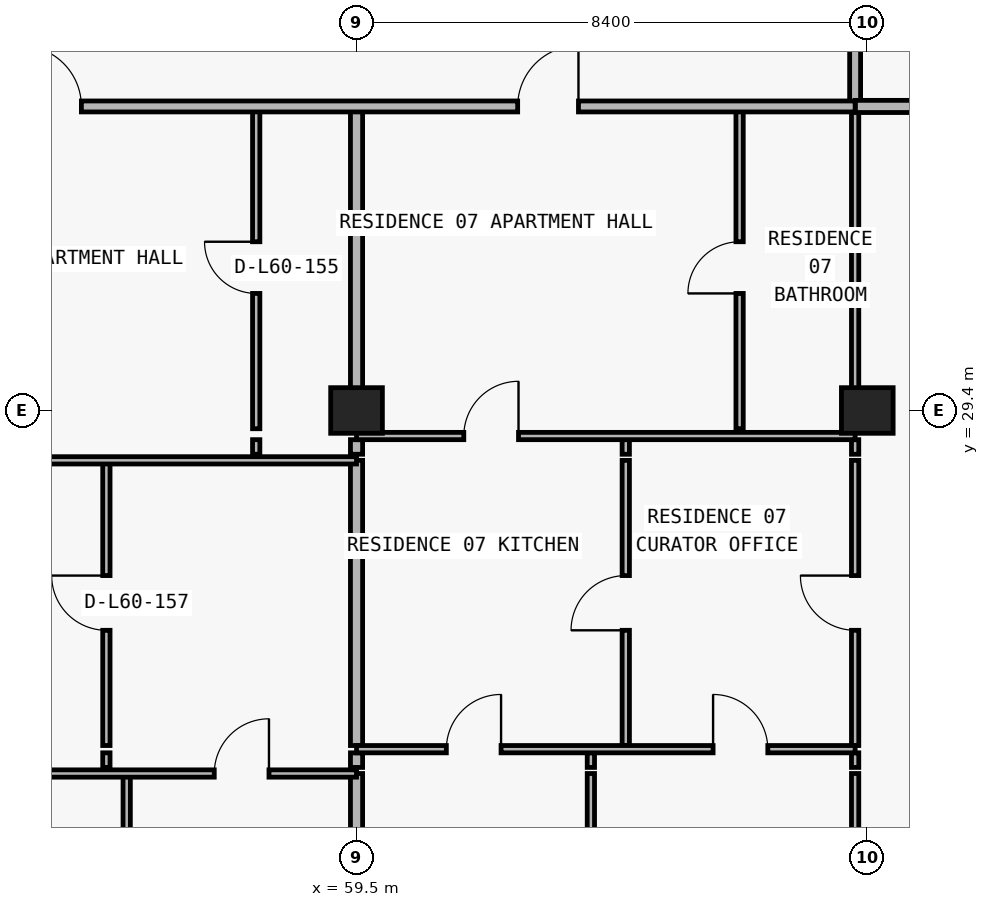
"""IFC4 building model, lengths in metres.
Left out: names, types, materials, properties, quantities, classifications, styles, units other than length and angle.
Written with IfcOpenShell. Run it as: python <this file> out.ifc"""

import sys

from ifc_helpers import new_model, si_unit, direction, frame, frame_2d, origin, origin_2d, place, context, subcontext, project, spatial, rectangle, extrude, element, fill, save


model = new_model("IFC4")
c1 = context("Model", 3, precision=1e-05, world=origin(), true_north=direction((0.0, 1.0)))
c2 = subcontext(c1, "Body", "Model", "MODEL_VIEW")
j1 = project(units=[si_unit("LENGTHUNIT", "METRE"), si_unit("PLANEANGLEUNIT", "RADIAN")], contexts=[c1])
p1 = place(None, origin())
s1 = spatial("IfcSite", under=j1, at=p1, CompositionType="ELEMENT")
p2 = place(p1, origin())
s2 = spatial("IfcBuilding", under=s1, at=p2, CompositionType="ELEMENT")
p3 = place(p2, frame((0.0, 0.0, 214.8)))
s3 = spatial("IfcBuildingStorey", under=s2, at=p3, CompositionType="ELEMENT", Elevation=214.8)
for number, where, z_axis, x_axis in (
    (1, (59.5, 29.4, 0.0), (0.0, 0.0, 1.0), (1.0, 0.0, 0.0)),
    (2, (67.9, 29.4, 0.0), (0.0, 0.0, 1.0), (1.0, 0.0, 0.0)),
):
    element("IfcColumn", number, at=place(p3, frame(where, z_axis=z_axis, x_axis=x_axis)), inside=s3, PredefinedType="COLUMN", context=c2, shape_type="SweptSolid", body=[
        extrude(rectangle(XDim=0.85, YDim=0.75, at=origin_2d()), origin(), (0.0, 0.0, 1.0), 3.05),
    ])
p4 = place(p3, frame((55.386, 23.53, 0.0), z_axis=(0.0, 0.0, 1.0), x_axis=(0.0, 1.0, 0.0)))
e3 = element("IfcWall", 3, at=p4, inside=s3, PredefinedType="PARTITIONING", context=c2, shape_type="SweptSolid", body=[
    extrude(rectangle(XDim=0.24, YDim=0.12, at=frame_2d((0.12, 0.0))), origin(), (0.0, 0.0, 1.0), 3.05),
])
p5 = place(p3, frame((55.386, 23.89, 0.0), z_axis=(0.0, 0.0, 1.0), x_axis=(0.0, 1.0, 0.0)))
e4 = element("IfcWall", 4, at=p5, inside=s3, PredefinedType="PARTITIONING", context=c2, shape_type="SweptSolid", body=[
    extrude(rectangle(XDim=4.69, YDim=0.12, at=frame_2d((2.345, 0.0))), origin(), (0.0, 0.0, 1.0), 3.05),
])
p6 = place(p5, frame((1.895, 0.0, 0.0)))
e5 = element("IfcOpeningElement", 5, at=p6, cuts=e4, PredefinedType="OPENING", context=c2, shape_type="SweptSolid", body=[
    extrude(rectangle(XDim=0.9, YDim=2.15, at=frame_2d((0.45, 1.075))), frame((0.0, 0.07, 0.0), z_axis=(0.0, -1.0, 0.0), x_axis=(1.0, 0.0, 0.0)), (0.0, 0.0, 1.0), 0.14),
])
p7 = place(p3, frame((55.72, 11.24, 0.0), z_axis=(0.0, 0.0, 1.0), x_axis=(0.0, 1.0, 0.0)))
e6 = element("IfcWall", 6, at=p7, inside=s3, PredefinedType="PARTITIONING", context=c2, shape_type="SweptSolid", body=[
    extrude(rectangle(XDim=12.19, YDim=0.12, at=frame_2d((6.095, 0.0))), origin(), (0.0, 0.0, 1.0), 3.05),
])
p8 = place(p3, frame((57.85, 28.68, 0.0), z_axis=(0.0, 0.0, 1.0), x_axis=(0.0, 1.0, 0.0)))
e7 = element("IfcWall", 7, at=p8, inside=s3, PredefinedType="PARTITIONING", context=c2, shape_type="SweptSolid", body=[
    extrude(rectangle(XDim=0.24, YDim=0.12, at=frame_2d((0.12, 0.0))), origin(), (0.0, 0.0, 1.0), 3.05),
])
p9 = place(p3, frame((57.85, 29.1, 0.0), z_axis=(0.0, 0.0, 1.0), x_axis=(0.0, 1.0, 0.0)))
e8 = element("IfcWall", 8, at=p9, inside=s3, PredefinedType="PARTITIONING", context=c2, shape_type="SweptSolid", body=[
    extrude(rectangle(XDim=5.3, YDim=0.12, at=frame_2d((2.65, 0.0))), origin(), (0.0, 0.0, 1.0), 3.05),
])
p10 = place(p9, frame((2.225, 0.0, 0.0)))
e9 = element("IfcOpeningElement", 9, at=p10, cuts=e8, PredefinedType="OPENING", context=c2, shape_type="SweptSolid", body=[
    extrude(rectangle(XDim=0.85, YDim=2.1, at=frame_2d((0.425, 1.05))), frame((0.0, 0.07, 0.0), z_axis=(0.0, -1.0, 0.0), x_axis=(1.0, 0.0, 0.0)), (0.0, 0.0, 1.0), 0.14),
])
p11 = place(p3, frame((59.5, 11.24, 0.0), z_axis=(0.0, 0.0, 1.0), x_axis=(0.0, 1.0, 0.0)))
e10 = element("IfcWall", 10, at=p11, inside=s3, PredefinedType="PARTITIONING", context=c2, shape_type="SweptSolid", body=[
    extrude(rectangle(XDim=12.19, YDim=0.2, at=frame_2d((6.095, 0.0))), origin(), (0.0, 0.0, 1.0), 2.263),
])
p12 = place(p3, frame((59.5, 23.53, 0.0), z_axis=(0.0, 0.0, 1.0), x_axis=(0.0, 1.0, 0.0)))
e11 = element("IfcWall", 11, at=p12, inside=s3, PredefinedType="PARTITIONING", context=c2, shape_type="SweptSolid", body=[
    extrude(rectangle(XDim=0.24, YDim=0.2, at=frame_2d((0.12, 0.0))), origin(), (0.0, 0.0, 1.0), 2.263),
])
p13 = place(p3, frame((59.5, 23.89, 0.0), z_axis=(0.0, 0.0, 1.0), x_axis=(0.0, 1.0, 0.0)))
e12 = element("IfcWall", 12, at=p13, inside=s3, PredefinedType="PARTITIONING", context=c2, shape_type="SweptSolid", body=[
    extrude(rectangle(XDim=4.69, YDim=0.2, at=frame_2d((2.345, 0.0))), origin(), (0.0, 0.0, 1.0), 2.263),
])
p14 = place(p3, frame((59.5, 28.68, 0.0), z_axis=(0.0, 0.0, 1.0), x_axis=(0.0, 1.0, 0.0)))
e13 = element("IfcWall", 13, at=p14, inside=s3, PredefinedType="PARTITIONING", context=c2, shape_type="SweptSolid", body=[
    extrude(rectangle(XDim=0.24, YDim=0.2, at=frame_2d((0.12, 0.0))), origin(), (0.0, 0.0, 1.0), 2.263),
])
p15 = place(p3, frame((59.5, 29.1, 0.0), z_axis=(0.0, 0.0, 1.0), x_axis=(0.0, 1.0, 0.0)))
e14 = element("IfcWall", 14, at=p15, inside=s3, PredefinedType="PARTITIONING", context=c2, shape_type="SweptSolid", body=[
    extrude(rectangle(XDim=5.3, YDim=0.2, at=frame_2d((2.65, 0.0))), origin(), (0.0, 0.0, 1.0), 2.263),
])
p16 = place(p3, frame((63.354, 11.24, 0.0), z_axis=(0.0, 0.0, 1.0), x_axis=(0.0, 1.0, 0.0)))
e15 = element("IfcWall", 15, at=p16, inside=s3, PredefinedType="PARTITIONING", context=c2, shape_type="SweptSolid", body=[
    extrude(rectangle(XDim=12.19, YDim=0.12, at=frame_2d((6.095, 0.0))), origin(), (0.0, 0.0, 1.0), 3.05),
])
p17 = place(p3, frame((63.354, 23.53, 0.0), z_axis=(0.0, 0.0, 1.0), x_axis=(0.0, 1.0, 0.0)))
e16 = element("IfcWall", 16, at=p17, inside=s3, PredefinedType="PARTITIONING", context=c2, shape_type="SweptSolid", body=[
    extrude(rectangle(XDim=0.24, YDim=0.12, at=frame_2d((0.12, 0.0))), origin(), (0.0, 0.0, 1.0), 3.05),
])
p18 = place(p3, frame((63.928, 23.89, 0.0), z_axis=(0.0, 0.0, 1.0), x_axis=(0.0, 1.0, 0.0)))
e17 = element("IfcWall", 17, at=p18, inside=s3, PredefinedType="PARTITIONING", context=c2, shape_type="SweptSolid", body=[
    extrude(rectangle(XDim=4.69, YDim=0.12, at=frame_2d((2.345, 0.0))), origin(), (0.0, 0.0, 1.0), 3.05),
])
p19 = place(p18, frame((1.895, 0.0, 0.0)))
e18 = element("IfcOpeningElement", 18, at=p19, cuts=e17, PredefinedType="OPENING", context=c2, shape_type="SweptSolid", body=[
    extrude(rectangle(XDim=0.9, YDim=2.15, at=frame_2d((0.45, 1.075))), frame((0.0, 0.07, 0.0), z_axis=(0.0, -1.0, 0.0), x_axis=(1.0, 0.0, 0.0)), (0.0, 0.0, 1.0), 0.14),
])
p20 = place(p3, frame((63.928, 28.68, 0.0), z_axis=(0.0, 0.0, 1.0), x_axis=(0.0, 1.0, 0.0)))
e19 = element("IfcWall", 19, at=p20, inside=s3, PredefinedType="PARTITIONING", context=c2, shape_type="SweptSolid", body=[
    extrude(rectangle(XDim=0.24, YDim=0.12, at=frame_2d((0.12, 0.0))), origin(), (0.0, 0.0, 1.0), 3.05),
])
p21 = place(p3, frame((65.8, 29.1, 0.0), z_axis=(0.0, 0.0, 1.0), x_axis=(0.0, 1.0, 0.0)))
e20 = element("IfcWall", 20, at=p21, inside=s3, PredefinedType="PARTITIONING", context=c2, shape_type="SweptSolid", body=[
    extrude(rectangle(XDim=5.3, YDim=0.12, at=frame_2d((2.65, 0.0))), origin(), (0.0, 0.0, 1.0), 3.05),
])
p22 = place(p21, frame((2.225, 0.0, 0.0)))
e21 = element("IfcOpeningElement", 21, at=p22, cuts=e20, PredefinedType="OPENING", context=c2, shape_type="SweptSolid", body=[
    extrude(rectangle(XDim=0.85, YDim=2.1, at=frame_2d((0.425, 1.05))), frame((0.0, 0.07, 0.0), z_axis=(0.0, -1.0, 0.0), x_axis=(1.0, 0.0, 0.0)), (0.0, 0.0, 1.0), 0.14),
])
p23 = place(p3, frame((67.7, 11.32, 0.0), z_axis=(0.0, 0.0, 1.0), x_axis=(0.0, 1.0, 0.0)))
e22 = element("IfcWall", 22, at=p23, inside=s3, PredefinedType="PARTITIONING", context=c2, shape_type="SweptSolid", body=[
    extrude(rectangle(XDim=12.11, YDim=0.12, at=frame_2d((6.055, 0.0))), origin(), (0.0, 0.0, 1.0), 2.263),
])
p24 = place(p3, frame((67.7, 23.53, 0.0), z_axis=(0.0, 0.0, 1.0), x_axis=(0.0, 1.0, 0.0)))
e23 = element("IfcWall", 23, at=p24, inside=s3, PredefinedType="PARTITIONING", context=c2, shape_type="SweptSolid", body=[
    extrude(rectangle(XDim=0.24, YDim=0.12, at=frame_2d((0.12, 0.0))), origin(), (0.0, 0.0, 1.0), 2.263),
])
p25 = place(p3, frame((67.7, 23.89, 0.0), z_axis=(0.0, 0.0, 1.0), x_axis=(0.0, 1.0, 0.0)))
e24 = element("IfcWall", 24, at=p25, inside=s3, PredefinedType="PARTITIONING", context=c2, shape_type="SweptSolid", body=[
    extrude(rectangle(XDim=4.69, YDim=0.12, at=frame_2d((2.345, 0.0))), origin(), (0.0, 0.0, 1.0), 2.263),
])
p26 = place(p25, frame((1.895, 0.0, 0.0)))
e25 = element("IfcOpeningElement", 25, at=p26, cuts=e24, PredefinedType="OPENING", context=c2, shape_type="SweptSolid", body=[
    extrude(rectangle(XDim=0.9, YDim=2.15, at=frame_2d((0.45, 1.075))), frame((0.0, 0.07, 0.0), z_axis=(0.0, -1.0, 0.0), x_axis=(1.0, 0.0, 0.0)), (0.0, 0.0, 1.0), 0.14),
])
p27 = place(p3, frame((67.7, 28.68, 0.0), z_axis=(0.0, 0.0, 1.0), x_axis=(0.0, 1.0, 0.0)))
e26 = element("IfcWall", 26, at=p27, inside=s3, PredefinedType="PARTITIONING", context=c2, shape_type="SweptSolid", body=[
    extrude(rectangle(XDim=0.24, YDim=0.12, at=frame_2d((0.12, 0.0))), origin(), (0.0, 0.0, 1.0), 2.263),
])
p28 = place(p3, frame((67.7, 29.1, 0.0), z_axis=(0.0, 0.0, 1.0), x_axis=(0.0, 1.0, 0.0)))
e27 = element("IfcWall", 27, at=p28, inside=s3, PredefinedType="PARTITIONING", context=c2, shape_type="SweptSolid", body=[
    extrude(rectangle(XDim=5.3, YDim=0.12, at=frame_2d((2.65, 0.0))), origin(), (0.0, 0.0, 1.0), 2.263),
])
p29 = place(p3, frame((67.7, 34.405, 0.0), z_axis=(0.0, 0.0, 1.0), x_axis=(0.0, 1.0, 0.0)))
e28 = element("IfcWall", 28, at=p29, inside=s3, PredefinedType="PARTITIONING", context=c2, shape_type="SweptSolid", body=[
    extrude(rectangle(XDim=2.595, YDim=0.18, at=frame_2d((1.297, 0.0))), origin(), (0.0, 0.0, 1.0), 2.263),
])
p30 = place(p3, frame((51.32, 23.43, 0.0), z_axis=(0.0, 0.0, 1.0), x_axis=(1.0, 0.0, 0.0)))
e29 = element("IfcWall", 29, at=p30, inside=s3, PredefinedType="PARTITIONING", context=c2, shape_type="SweptSolid", body=[
    extrude(rectangle(XDim=8.18, YDim=0.12, at=frame_2d((4.09, 0.0))), origin(), (0.0, 0.0, 1.0), 3.05),
])
p31 = place(p30, frame((1.583, 0.0, 0.0)))
e30 = element("IfcOpeningElement", 30, at=p31, cuts=e29, PredefinedType="OPENING", context=c2, shape_type="SweptSolid", body=[
    extrude(rectangle(XDim=0.9, YDim=2.15, at=frame_2d((0.45, 1.075))), frame((0.0, 0.07, 0.0), z_axis=(0.0, -1.0, 0.0), x_axis=(1.0, 0.0, 0.0)), (0.0, 0.0, 1.0), 0.14),
])
p32 = place(p30, frame((5.84, 0.0, 0.0)))
e31 = element("IfcOpeningElement", 31, at=p32, cuts=e29, PredefinedType="OPENING", context=c2, shape_type="SweptSolid", body=[
    extrude(rectangle(XDim=0.9, YDim=2.15, at=frame_2d((0.45, 1.075))), frame((0.0, 0.07, 0.0), z_axis=(0.0, -1.0, 0.0), x_axis=(1.0, 0.0, 0.0)), (0.0, 0.0, 1.0), 0.14),
])
p33 = place(p3, frame((59.5, 23.83, 0.0), z_axis=(0.0, 0.0, 1.0), x_axis=(1.0, 0.0, 0.0)))
e32 = element("IfcWall", 32, at=p33, inside=s3, PredefinedType="PARTITIONING", context=c2, shape_type="SweptSolid", body=[
    extrude(rectangle(XDim=8.2, YDim=0.12, at=frame_2d((4.1, 0.0))), origin(), (0.0, 0.0, 1.0), 3.05),
])
p34 = place(p33, frame((1.477, 0.0, 0.0)))
e33 = element("IfcOpeningElement", 33, at=p34, cuts=e32, PredefinedType="OPENING", context=c2, shape_type="SweptSolid", body=[
    extrude(rectangle(XDim=0.9, YDim=2.15, at=frame_2d((0.45, 1.075))), frame((0.0, 0.07, 0.0), z_axis=(0.0, -1.0, 0.0), x_axis=(1.0, 0.0, 0.0)), (0.0, 0.0, 1.0), 0.14),
])
p35 = place(p33, frame((5.864, 0.0, 0.0)))
e34 = element("IfcOpeningElement", 34, at=p35, cuts=e32, PredefinedType="OPENING", context=c2, shape_type="SweptSolid", body=[
    extrude(rectangle(XDim=0.9, YDim=2.15, at=frame_2d((0.45, 1.075))), frame((0.0, 0.07, 0.0), z_axis=(0.0, -1.0, 0.0), x_axis=(1.0, 0.0, 0.0)), (0.0, 0.0, 1.0), 0.14),
])
p36 = place(p3, frame((51.32, 28.58, 0.0), z_axis=(0.0, 0.0, 1.0), x_axis=(1.0, 0.0, 0.0)))
e35 = element("IfcWall", 35, at=p36, inside=s3, PredefinedType="PARTITIONING", context=c2, shape_type="SweptSolid", body=[
    extrude(rectangle(XDim=8.18, YDim=0.12, at=frame_2d((4.09, 0.0))), origin(), (0.0, 0.0, 1.0), 3.05),
])
p37 = place(p36, frame((1.583, 0.0, 0.0)))
e36 = element("IfcOpeningElement", 36, at=p37, cuts=e35, PredefinedType="OPENING", context=c2, shape_type="SweptSolid", body=[
    extrude(rectangle(XDim=0.9, YDim=2.15, at=frame_2d((0.45, 1.075))), frame((0.0, 0.07, 0.0), z_axis=(0.0, -1.0, 0.0), x_axis=(1.0, 0.0, 0.0)), (0.0, 0.0, 1.0), 0.14),
])
p38 = place(p3, frame((59.5, 28.98, 0.0), z_axis=(0.0, 0.0, 1.0), x_axis=(1.0, 0.0, 0.0)))
e37 = element("IfcWall", 37, at=p38, inside=s3, PredefinedType="PARTITIONING", context=c2, shape_type="SweptSolid", body=[
    extrude(rectangle(XDim=8.2, YDim=0.12, at=frame_2d((4.1, 0.0))), origin(), (0.0, 0.0, 1.0), 3.05),
])
p39 = place(p38, frame((1.764, 0.0, 0.0)))
e38 = element("IfcOpeningElement", 38, at=p39, cuts=e37, PredefinedType="OPENING", context=c2, shape_type="SweptSolid", body=[
    extrude(rectangle(XDim=0.9, YDim=2.15, at=frame_2d((0.45, 1.075))), frame((0.0, 0.07, 0.0), z_axis=(0.0, -1.0, 0.0), x_axis=(1.0, 0.0, 0.0)), (0.0, 0.0, 1.0), 0.14),
])
p40 = place(p3, frame((39.28, 34.4, 0.0), z_axis=(0.0, 0.0, 1.0), x_axis=(1.0, 0.0, 0.0)))
e39 = element("IfcWall", 39, at=p40, inside=s3, PredefinedType="PARTITIONING", context=c2, shape_type="SweptSolid", body=[
    extrude(rectangle(XDim=28.42, YDim=0.18, at=frame_2d((14.21, 0.0))), origin(), (0.0, 0.0, 1.0), 3.05),
])
p41 = place(p40, frame((6.18, 0.0, 0.0)))
e40 = element("IfcOpeningElement", 40, at=p41, cuts=e39, PredefinedType="OPENING", context=c2, shape_type="SweptSolid", body=[
    extrude(rectangle(XDim=1.0, YDim=2.2, at=frame_2d((0.5, 1.1))), frame((0.0, 0.1, 0.0), z_axis=(0.0, -1.0, 0.0), x_axis=(1.0, 0.0, 0.0)), (0.0, 0.0, 1.0), 0.2),
])
p42 = place(p40, frame((14.695, 0.0, 0.0)))
e41 = element("IfcOpeningElement", 41, at=p42, cuts=e39, PredefinedType="OPENING", context=c2, shape_type="SweptSolid", body=[
    extrude(rectangle(XDim=1.0, YDim=2.2, at=frame_2d((0.5, 1.1))), frame((0.0, 0.1, 0.0), z_axis=(0.0, -1.0, 0.0), x_axis=(1.0, 0.0, 0.0)), (0.0, 0.0, 1.0), 0.2),
])
p43 = place(p40, frame((22.87, 0.0, 0.0)))
e42 = element("IfcOpeningElement", 42, at=p43, cuts=e39, PredefinedType="OPENING", context=c2, shape_type="SweptSolid", body=[
    extrude(rectangle(XDim=1.0, YDim=2.2, at=frame_2d((0.5, 1.1))), frame((0.0, 0.1, 0.0), z_axis=(0.0, -1.0, 0.0), x_axis=(1.0, 0.0, 0.0)), (0.0, 0.0, 1.0), 0.2),
])
p44 = place(p3, frame((67.705, 34.4, 0.0), z_axis=(0.0, 0.0, 1.0), x_axis=(1.0, 0.0, 0.0)))
e43 = element("IfcWall", 43, at=p44, inside=s3, PredefinedType="PARTITIONING", context=c2, shape_type="SweptSolid", body=[
    extrude(rectangle(XDim=3.7, YDim=0.2, at=frame_2d((1.85, 0.0))), origin(), (0.0, 0.0, 1.0), 3.05),
])
p45 = place(p42, origin())
e44 = element("IfcDoor", 44, at=p45, inside=s3, OperationType="SINGLE_SWING_LEFT", PredefinedType="DOOR", context=c2, shape_type="SweptSolid", body=[
    extrude(rectangle(XDim=1.0, YDim=2.2, at=frame_2d((0.5, 1.1))), frame((0.0, 0.025, 0.0), z_axis=(0.0, -1.0, 0.0), x_axis=(1.0, 0.0, 0.0)), (0.0, 0.0, 1.0), 0.05),
])
fill(e41, e44)
p46 = place(p10, origin())
e45 = element("IfcDoor", 45, at=p46, inside=s3, OperationType="SINGLE_SWING_RIGHT", PredefinedType="DOOR", context=c2, shape_type="SweptSolid", body=[
    extrude(rectangle(XDim=0.85, YDim=2.1, at=frame_2d((0.425, 1.05))), frame((0.0, 0.025, 0.0), z_axis=(0.0, -1.0, 0.0), x_axis=(1.0, 0.0, 0.0)), (0.0, 0.0, 1.0), 0.05),
])
fill(e9, e45)
p47 = place(p6, origin())
e46 = element("IfcDoor", 46, at=p47, inside=s3, OperationType="SINGLE_SWING_RIGHT", PredefinedType="DOOR", context=c2, shape_type="SweptSolid", body=[
    extrude(rectangle(XDim=0.9, YDim=2.15, at=frame_2d((0.45, 1.075))), frame((0.0, 0.025, 0.0), z_axis=(0.0, -1.0, 0.0), x_axis=(1.0, 0.0, 0.0)), (0.0, 0.0, 1.0), 0.05),
])
fill(e5, e46)
p48 = place(p32, origin())
e47 = element("IfcDoor", 47, at=p48, inside=s3, OperationType="SINGLE_SWING_RIGHT", PredefinedType="DOOR", context=c2, shape_type="SweptSolid", body=[
    extrude(rectangle(XDim=0.9, YDim=2.15, at=frame_2d((0.45, 1.075))), frame((0.0, 0.025, 0.0), z_axis=(0.0, -1.0, 0.0), x_axis=(1.0, 0.0, 0.0)), (0.0, 0.0, 1.0), 0.05),
])
fill(e31, e47)
p49 = place(p43, origin())
e48 = element("IfcDoor", 48, at=p49, inside=s3, OperationType="SINGLE_SWING_RIGHT", PredefinedType="DOOR", context=c2, shape_type="SweptSolid", body=[
    extrude(rectangle(XDim=1.0, YDim=2.2, at=frame_2d((0.5, 1.1))), frame((0.0, 0.025, 0.0), z_axis=(0.0, -1.0, 0.0), x_axis=(1.0, 0.0, 0.0)), (0.0, 0.0, 1.0), 0.05),
])
fill(e42, e48)
p50 = place(p22, origin())
e49 = element("IfcDoor", 49, at=p50, inside=s3, OperationType="SINGLE_SWING_LEFT", PredefinedType="DOOR", context=c2, shape_type="SweptSolid", body=[
    extrude(rectangle(XDim=0.85, YDim=2.1, at=frame_2d((0.425, 1.05))), frame((0.0, 0.025, 0.0), z_axis=(0.0, -1.0, 0.0), x_axis=(1.0, 0.0, 0.0)), (0.0, 0.0, 1.0), 0.05),
])
fill(e21, e49)
p51 = place(p39, origin())
e50 = element("IfcDoor", 50, at=p51, inside=s3, OperationType="SINGLE_SWING_RIGHT", PredefinedType="DOOR", context=c2, shape_type="SweptSolid", body=[
    extrude(rectangle(XDim=0.9, YDim=2.15, at=frame_2d((0.45, 1.075))), frame((0.0, 0.025, 0.0), z_axis=(0.0, -1.0, 0.0), x_axis=(1.0, 0.0, 0.0)), (0.0, 0.0, 1.0), 0.05),
])
fill(e38, e50)
p52 = place(p19, origin())
e51 = element("IfcDoor", 51, at=p52, inside=s3, OperationType="SINGLE_SWING_LEFT", PredefinedType="DOOR", context=c2, shape_type="SweptSolid", body=[
    extrude(rectangle(XDim=0.9, YDim=2.15, at=frame_2d((0.45, 1.075))), frame((0.0, 0.025, 0.0), z_axis=(0.0, -1.0, 0.0), x_axis=(1.0, 0.0, 0.0)), (0.0, 0.0, 1.0), 0.05),
])
fill(e18, e51)
p53 = place(p34, origin())
e52 = element("IfcDoor", 52, at=p53, inside=s3, OperationType="SINGLE_SWING_RIGHT", PredefinedType="DOOR", context=c2, shape_type="SweptSolid", body=[
    extrude(rectangle(XDim=0.9, YDim=2.15, at=frame_2d((0.45, 1.075))), frame((0.0, 0.025, 0.0), z_axis=(0.0, -1.0, 0.0), x_axis=(1.0, 0.0, 0.0)), (0.0, 0.0, 1.0), 0.05),
])
fill(e33, e52)
p54 = place(p35, origin())
e53 = element("IfcDoor", 53, at=p54, inside=s3, OperationType="SINGLE_SWING_LEFT", PredefinedType="DOOR", context=c2, shape_type="SweptSolid", body=[
    extrude(rectangle(XDim=0.9, YDim=2.15, at=frame_2d((0.45, 1.075))), frame((0.0, 0.025, 0.0), z_axis=(0.0, -1.0, 0.0), x_axis=(1.0, 0.0, 0.0)), (0.0, 0.0, 1.0), 0.05),
])
fill(e34, e53)
p55 = place(p26, origin())
e54 = element("IfcDoor", 54, at=p55, inside=s3, OperationType="SINGLE_SWING_RIGHT", PredefinedType="DOOR", context=c2, shape_type="SweptSolid", body=[
    extrude(rectangle(XDim=0.9, YDim=2.15, at=frame_2d((0.45, 1.075))), frame((0.0, 0.025, 0.0), z_axis=(0.0, -1.0, 0.0), x_axis=(1.0, 0.0, 0.0)), (0.0, 0.0, 1.0), 0.05),
])
fill(e25, e54)
save(model, sys.argv[1])
